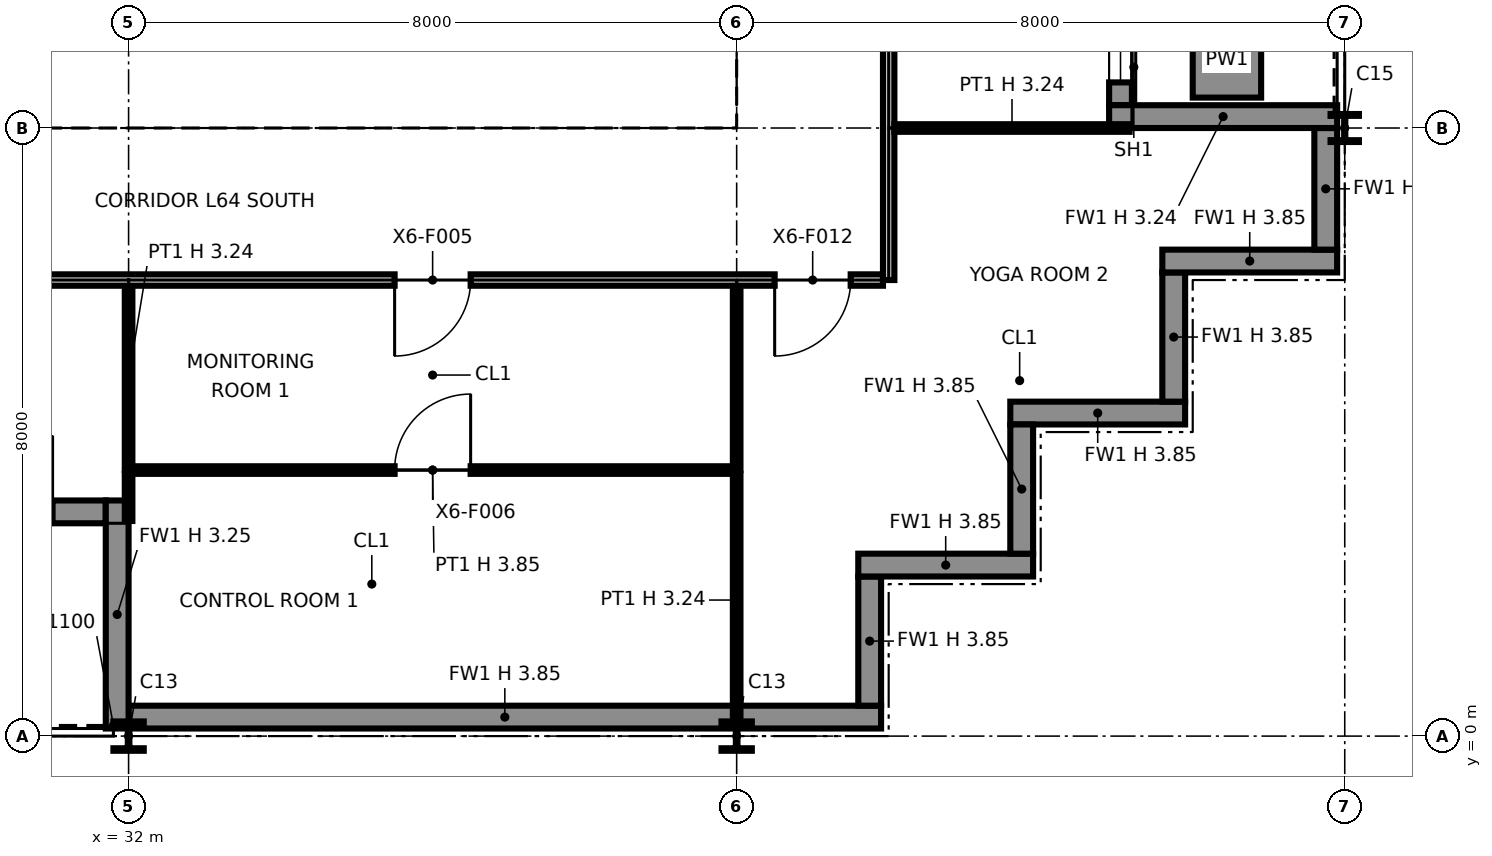
"""IFC4 building model, lengths in metres.
Left out: names, types, materials, properties, quantities, classifications, styles, units other than length and angle.
Written with IfcOpenShell. Run it as: python <this file> out.ifc"""

import sys

from ifc_helpers import new_model, si_unit, direction, frame, frame_2d, origin, origin_2d, place, context, subcontext, project, spatial, polyline, rectangle, i_section, outline, extrude, element, fill, save


model = new_model("IFC4")
c1 = context("Model", 3, precision=1e-05, world=origin(), true_north=direction((0.0, 1.0)))
c2 = subcontext(c1, "Body", "Model", "MODEL_VIEW")
j1 = project(units=[si_unit("LENGTHUNIT", "METRE"), si_unit("PLANEANGLEUNIT", "RADIAN")], contexts=[c1])
p1 = place(None, origin())
s1 = spatial("IfcSite", under=j1, at=p1, CompositionType="ELEMENT")
p2 = place(p1, origin())
s2 = spatial("IfcBuilding", under=s1, at=p2, CompositionType="ELEMENT")
p3 = place(p2, frame((0.0, 0.0, 291.0)))
s3 = spatial("IfcBuildingStorey", under=s2, at=p3, CompositionType="ELEMENT", Elevation=291.0)
p4 = place(p3, frame((32.0, 0.0, 0.0), z_axis=(0.0, 0.0, 1.0), x_axis=(1.0, 0.0, 0.0)))
e1 = element("IfcColumn", 1, at=p4, inside=s3, PredefinedType="COLUMN", context=c2, shape_type="SweptSolid", body=[
    extrude(i_section(OverallWidth=0.399, OverallDepth=0.386, WebThickness=0.021, FlangeThickness=0.033, at=origin_2d()), origin(), (0.0, 0.0, 1.0), 3.85),
])
p5 = place(p3, frame((32.0, 8.0, 0.0), z_axis=(0.0, 0.0, 1.0), x_axis=(1.0, 0.0, 0.0)))
e2 = element("IfcColumn", 2, at=p5, inside=s3, PredefinedType="COLUMN", context=c2, shape_type="SweptSolid", body=[
    extrude(i_section(OverallWidth=0.257, OverallDepth=0.363, WebThickness=0.013, FlangeThickness=0.022, at=origin_2d()), origin(), (0.0, 0.0, 1.0), 3.85),
])
p6 = place(p3, frame((40.0, 0.0, 0.0), z_axis=(0.0, 0.0, 1.0), x_axis=(1.0, 0.0, 0.0)))
e3 = element("IfcColumn", 3, at=p6, inside=s3, PredefinedType="COLUMN", context=c2, shape_type="SweptSolid", body=[
    extrude(i_section(OverallWidth=0.399, OverallDepth=0.386, WebThickness=0.021, FlangeThickness=0.033, at=origin_2d()), origin(), (0.0, 0.0, 1.0), 3.85),
])
p7 = place(p3, frame((40.0, 8.0, 0.0), z_axis=(0.0, 0.0, 1.0), x_axis=(1.0, 0.0, 0.0)))
e4 = element("IfcColumn", 4, at=p7, inside=s3, PredefinedType="COLUMN", context=c2, shape_type="SweptSolid", body=[
    extrude(i_section(OverallWidth=0.257, OverallDepth=0.363, WebThickness=0.013, FlangeThickness=0.022, at=origin_2d()), origin(), (0.0, 0.0, 1.0), 3.85),
])
p8 = place(p3, frame((48.0, 8.0, 0.0), z_axis=(0.0, 0.0, 1.0), x_axis=(1.0, 0.0, 0.0)))
e5 = element("IfcColumn", 5, at=p8, inside=s3, PredefinedType="COLUMN", context=c2, shape_type="SweptSolid", body=[
    extrude(i_section(OverallWidth=0.373, OverallDepth=0.368, WebThickness=0.015, FlangeThickness=0.024, at=origin_2d()), origin(), (0.0, 0.0, 1.0), 3.85),
])
p9 = place(p3, frame((24.3, 2.95, 0.0), z_axis=(0.0, 0.0, 1.0), x_axis=(1.0, 0.0, 0.0)))
e6 = element("IfcWall", 6, at=p9, inside=s3, PredefinedType="SOLIDWALL", context=c2, shape_type="SweptSolid", body=[
    extrude(rectangle(XDim=7.4, YDim=0.3, at=frame_2d((3.7, 0.0))), origin(), (0.0, 0.0, 1.0), 3.85),
])
p10 = place(p9, frame((0.3, 0.0, 0.9)))
e7 = element("IfcOpeningElement", 7, at=p10, cuts=e6, PredefinedType="OPENING", context=c2, shape_type="SweptSolid", body=[
    extrude(rectangle(XDim=2.8, YDim=2.2, at=frame_2d((1.4, 1.1))), frame((0.0, 0.16, 0.0), z_axis=(0.0, -1.0, 0.0), x_axis=(1.0, 0.0, 0.0)), (0.0, 0.0, 1.0), 0.32),
])
p11 = place(p9, frame((4.7, 0.0, 0.0)))
e8 = element("IfcOpeningElement", 8, at=p11, cuts=e6, PredefinedType="OPENING", context=c2, shape_type="SweptSolid", body=[
    extrude(rectangle(XDim=2.0, YDim=2.4, at=frame_2d((1.0, 1.2))), frame((0.0, 0.16, 0.0), z_axis=(0.0, -1.0, 0.0), x_axis=(1.0, 0.0, 0.0)), (0.0, 0.0, 1.0), 0.32),
])
p12 = place(p3, frame((31.85, 0.1, 0.0), z_axis=(0.0, 0.0, 1.0), x_axis=(0.0, 1.0, 0.0)))
e9 = element("IfcWall", 9, at=p12, inside=s3, PredefinedType="SOLIDWALL", context=c2, shape_type="SweptSolid", body=[
    extrude(rectangle(XDim=3.0, YDim=0.3, at=frame_2d((1.5, 0.0))), origin(), (0.0, 0.0, 1.0), 3.247),
])
p13 = place(p3, frame((32.0, 0.25, 0.0), z_axis=(0.0, 0.0, 1.0), x_axis=(1.0, 0.0, 0.0)))
e10 = element("IfcWall", 10, at=p13, inside=s3, PredefinedType="SOLIDWALL", context=c2, shape_type="SweptSolid", body=[
    extrude(rectangle(XDim=9.9, YDim=0.3, at=frame_2d((4.95, 0.0))), origin(), (0.0, 0.0, 1.0), 3.85),
])
p14 = place(p3, frame((41.75, 0.4, 0.0), z_axis=(0.0, 0.0, 1.0), x_axis=(0.0, 1.0, 0.0)))
e11 = element("IfcWall", 11, at=p14, inside=s3, PredefinedType="SOLIDWALL", context=c2, shape_type="SweptSolid", body=[
    extrude(rectangle(XDim=1.7, YDim=0.3, at=frame_2d((0.85, 0.0))), origin(), (0.0, 0.0, 1.0), 3.85),
])
p15 = place(p3, frame((41.6, 2.25, 0.0), z_axis=(0.0, 0.0, 1.0), x_axis=(1.0, 0.0, 0.0)))
e12 = element("IfcWall", 12, at=p15, inside=s3, PredefinedType="SOLIDWALL", context=c2, shape_type="SweptSolid", body=[
    extrude(rectangle(XDim=2.3, YDim=0.3, at=frame_2d((1.15, 0.0))), origin(), (0.0, 0.0, 1.0), 3.85),
])
p16 = place(p3, frame((43.75, 2.4, 0.0), z_axis=(0.0, 0.0, 1.0), x_axis=(0.0, 1.0, 0.0)))
e13 = element("IfcWall", 13, at=p16, inside=s3, PredefinedType="SOLIDWALL", context=c2, shape_type="SweptSolid", body=[
    extrude(rectangle(XDim=1.7, YDim=0.3, at=frame_2d((0.85, 0.0))), origin(), (0.0, 0.0, 1.0), 3.85),
])
p17 = place(p3, frame((43.6, 4.25, 0.0), z_axis=(0.0, 0.0, 1.0), x_axis=(1.0, 0.0, 0.0)))
e14 = element("IfcWall", 14, at=p17, inside=s3, PredefinedType="SOLIDWALL", context=c2, shape_type="SweptSolid", body=[
    extrude(rectangle(XDim=2.3, YDim=0.3, at=frame_2d((1.15, 0.0))), origin(), (0.0, 0.0, 1.0), 3.85),
])
p18 = place(p3, frame((45.75, 4.4, 0.0), z_axis=(0.0, 0.0, 1.0), x_axis=(0.0, 1.0, 0.0)))
e15 = element("IfcWall", 15, at=p18, inside=s3, PredefinedType="SOLIDWALL", context=c2, shape_type="SweptSolid", body=[
    extrude(rectangle(XDim=1.7, YDim=0.3, at=frame_2d((0.85, 0.0))), origin(), (0.0, 0.0, 1.0), 3.85),
])
p19 = place(p3, frame((45.6, 6.25, 0.0), z_axis=(0.0, 0.0, 1.0), x_axis=(1.0, 0.0, 0.0)))
e16 = element("IfcWall", 16, at=p19, inside=s3, PredefinedType="SOLIDWALL", context=c2, shape_type="SweptSolid", body=[
    extrude(rectangle(XDim=2.3, YDim=0.3, at=frame_2d((1.15, 0.0))), origin(), (0.0, 0.0, 1.0), 3.85),
])
p20 = place(p3, frame((47.75, 6.4, 0.0), z_axis=(0.0, 0.0, 1.0), x_axis=(0.0, 1.0, 0.0)))
e17 = element("IfcWall", 17, at=p20, inside=s3, PredefinedType="SOLIDWALL", context=c2, shape_type="SweptSolid", body=[
    extrude(rectangle(XDim=1.6, YDim=0.3, at=frame_2d((0.8, 0.0))), origin(), (0.0, 0.0, 1.0), 3.85),
])
p21 = place(p3, frame((45.05, 8.3, 0.0), z_axis=(0.0, 0.0, 1.0), x_axis=(0.0, 1.0, 0.0)))
e18 = element("IfcWall", 18, at=p21, inside=s3, PredefinedType="SOLIDWALL", context=c2, shape_type="SweptSolid", body=[
    extrude(rectangle(XDim=7.4, YDim=0.3, at=frame_2d((3.7, 0.0))), origin(), (0.0, 0.0, 1.0), 3.85),
])
p22 = place(p21, frame((0.3, 0.0, 0.9)))
e19 = element("IfcOpeningElement", 19, at=p22, cuts=e18, PredefinedType="OPENING", context=c2, shape_type="SweptSolid", body=[
    extrude(rectangle(XDim=2.8, YDim=2.2, at=frame_2d((1.4, 1.1))), frame((0.0, 0.16, 0.0), z_axis=(0.0, -1.0, 0.0), x_axis=(1.0, 0.0, 0.0)), (0.0, 0.0, 1.0), 0.32),
])
p23 = place(p21, frame((4.7, 0.0, 0.0)))
e20 = element("IfcOpeningElement", 20, at=p23, cuts=e18, PredefinedType="OPENING", context=c2, shape_type="SweptSolid", body=[
    extrude(rectangle(XDim=2.0, YDim=2.4, at=frame_2d((1.0, 1.2))), frame((0.0, 0.16, 0.0), z_axis=(0.0, -1.0, 0.0), x_axis=(1.0, 0.0, 0.0)), (0.0, 0.0, 1.0), 0.32),
])
p24 = place(p3, frame((47.9, 8.15, 0.0), z_axis=(0.0, 0.0, 1.0), x_axis=(-1.0, 0.0, 0.0)))
e21 = element("IfcWall", 21, at=p24, inside=s3, PredefinedType="SOLIDWALL", context=c2, shape_type="SweptSolid", body=[
    extrude(rectangle(XDim=3.0, YDim=0.3, at=frame_2d((1.5, 0.0))), origin(), (0.0, 0.0, 1.0), 3.237),
])
p25 = place(p3, frame((46.45, 8.4, 0.0), z_axis=(0.0, 0.0, 1.0), x_axis=(0.0, 1.0, 0.0)))
e22 = element("IfcWall", 22, at=p25, inside=s3, PredefinedType="SOLIDWALL", context=c2, shape_type="SweptSolid", body=[
    extrude(rectangle(XDim=3.2, YDim=0.9, at=frame_2d((1.6, 0.0))), origin(), (0.0, 0.0, 1.0), 0.6),
])
p26 = place(p3, frame((24.65, 8.75, 0.0), z_axis=(0.0, 0.0, 1.0), x_axis=(1.0, 0.0, 0.0)))
e23 = element("IfcWall", 23, at=p26, inside=s3, PredefinedType="PARTITIONING", context=c2, shape_type="SweptSolid", body=[
    extrude(outline(polyline([(0.0, 0.0), (14.7, 0.0), (14.7, 3.85), (7.438, 3.85), (7.437, 3.318), (7.263, 3.318), (7.262, 3.85), (0.0, 3.85), (0.0, 0.0)])), frame((0.0, 0.1, 0.0), z_axis=(0.0, -1.0, 0.0), x_axis=(1.0, 0.0, 0.0)), (0.0, 0.0, 1.0), 0.2),
])
p27 = place(p3, frame((32.0, 8.85, 0.0), z_axis=(0.0, 0.0, 1.0), x_axis=(0.0, 1.0, 0.0)))
e24 = element("IfcWall", 24, at=p27, inside=s3, PredefinedType="PARTITIONING", context=c2, shape_type="SweptSolid", body=[
    extrude(rectangle(XDim=2.55, YDim=0.6, at=frame_2d((1.275, 0.0))), origin(), (0.0, 0.0, 1.0), 3.318),
])
for number, where, z_axis, x_axis in (
    (25, (35.6, 8.85, 0.0), (0.0, 0.0, 1.0), (0.0, 1.0, 0.0)),
    (26, (39.25, 8.85, 0.0), (0.0, 0.0, 1.0), (0.0, 1.0, 0.0)),
):
    element("IfcWall", number, at=place(p3, frame(where, z_axis=z_axis, x_axis=x_axis)), inside=s3, PredefinedType="PARTITIONING", context=c2, shape_type="SweptSolid", body=[
        extrude(rectangle(XDim=6.3, YDim=0.2, at=frame_2d((3.15, 0.0))), origin(), (0.0, 0.0, 1.0), 3.85),
    ])
p28 = place(p3, frame((40.0, 0.13, 0.0), z_axis=(0.0, 0.0, 1.0), x_axis=(0.0, 1.0, 0.0)))
e27 = element("IfcWall", 27, at=p28, inside=s3, PredefinedType="PARTITIONING", context=c2, shape_type="SweptSolid", body=[
    extrude(rectangle(XDim=3.32, YDim=0.1, at=frame_2d((1.66, 0.0))), origin(), (0.0, 0.0, 1.0), 3.238),
])
p29 = place(p3, frame((32.0, 2.83, 0.0), z_axis=(0.0, 0.0, 1.0), x_axis=(0.0, 1.0, 0.0)))
e28 = element("IfcWall", 28, at=p29, inside=s3, PredefinedType="PARTITIONING", context=c2, shape_type="SweptSolid", body=[
    extrude(rectangle(XDim=0.62, YDim=0.1, at=frame_2d((0.31, 0.0))), origin(), (0.0, 0.0, 1.0), 3.238),
])
p30 = place(p3, frame((32.05, 3.5, 0.0), z_axis=(0.0, 0.0, 1.0), x_axis=(1.0, 0.0, 0.0)))
e29 = element("IfcWall", 29, at=p30, inside=s3, PredefinedType="PARTITIONING", context=c2, shape_type="SweptSolid", body=[
    extrude(rectangle(XDim=7.9, YDim=0.1, at=frame_2d((3.95, 0.0))), origin(), (0.0, 0.0, 1.0), 3.85),
])
p31 = place(p30, frame((3.45, 0.0, 0.0)))
e30 = element("IfcOpeningElement", 30, at=p31, cuts=e29, PredefinedType="OPENING", context=c2, shape_type="SweptSolid", body=[
    extrude(rectangle(XDim=1.0, YDim=2.1, at=frame_2d((0.5, 1.05))), frame((0.0, 0.06, 0.0), z_axis=(0.0, -1.0, 0.0), x_axis=(1.0, 0.0, 0.0)), (0.0, 0.0, 1.0), 0.12),
])
for number, where, z_axis, x_axis in (
    (31, (32.0, 3.5, 0.0), (0.0, 0.0, 1.0), (0.0, 1.0, 0.0)),
    (32, (40.0, 3.5, 0.0), (0.0, 0.0, 1.0), (0.0, 1.0, 0.0)),
):
    element("IfcWall", number, at=place(p3, frame(where, z_axis=z_axis, x_axis=x_axis)), inside=s3, PredefinedType="PARTITIONING", context=c2, shape_type="SweptSolid", body=[
        extrude(rectangle(XDim=2.425, YDim=0.1, at=frame_2d((1.212, 0.0))), origin(), (0.0, 0.0, 1.0), 3.238),
    ])
p32 = place(p3, frame((6.075, 6.0, 0.0), z_axis=(0.0, 0.0, 1.0), x_axis=(1.0, 0.0, 0.0)))
e33 = element("IfcWall", 33, at=p32, inside=s3, PredefinedType="PARTITIONING", context=c2, shape_type="SweptSolid", body=[
    extrude(rectangle(XDim=35.85, YDim=0.15, at=frame_2d((17.925, 0.0))), origin(), (0.0, 0.0, 1.0), 3.85),
])
p33 = place(p32, frame((12.425, 0.0, 0.0), z_axis=(0.0, 0.0, 1.0), x_axis=(-1.0, 0.0, 0.0)))
e34 = element("IfcOpeningElement", 34, at=p33, cuts=e33, PredefinedType="OPENING", context=c2, shape_type="SweptSolid", body=[
    extrude(rectangle(XDim=1.0, YDim=2.1, at=frame_2d((0.5, 1.05))), frame((0.0, 0.085, 0.0), z_axis=(0.0, -1.0, 0.0), x_axis=(1.0, 0.0, 0.0)), (0.0, 0.0, 1.0), 0.17),
])
p34 = place(p32, frame((16.425, 0.0, 0.0), z_axis=(0.0, 0.0, 1.0), x_axis=(-1.0, 0.0, 0.0)))
e35 = element("IfcOpeningElement", 35, at=p34, cuts=e33, PredefinedType="OPENING", context=c2, shape_type="SweptSolid", body=[
    extrude(rectangle(XDim=1.0, YDim=2.1, at=frame_2d((0.5, 1.05))), frame((0.0, 0.085, 0.0), z_axis=(0.0, -1.0, 0.0), x_axis=(1.0, 0.0, 0.0)), (0.0, 0.0, 1.0), 0.17),
])
p35 = place(p32, frame((30.425, 0.0, 0.0), z_axis=(0.0, 0.0, 1.0), x_axis=(-1.0, 0.0, 0.0)))
e36 = element("IfcOpeningElement", 36, at=p35, cuts=e33, PredefinedType="OPENING", context=c2, shape_type="SweptSolid", body=[
    extrude(rectangle(XDim=1.0, YDim=2.1, at=frame_2d((0.5, 1.05))), frame((0.0, 0.085, 0.0), z_axis=(0.0, -1.0, 0.0), x_axis=(1.0, 0.0, 0.0)), (0.0, 0.0, 1.0), 0.17),
])
p36 = place(p32, frame((4.425, 0.0, 0.0), z_axis=(0.0, 0.0, 1.0), x_axis=(-1.0, 0.0, 0.0)))
e37 = element("IfcOpeningElement", 37, at=p36, cuts=e33, PredefinedType="OPENING", context=c2, shape_type="SweptSolid", body=[
    extrude(rectangle(XDim=1.0, YDim=2.1, at=frame_2d((0.5, 1.05))), frame((0.0, 0.085, 0.0), z_axis=(0.0, -1.0, 0.0), x_axis=(1.0, 0.0, 0.0)), (0.0, 0.0, 1.0), 0.17),
])
p37 = place(p32, frame((8.425, 0.0, 0.0), z_axis=(0.0, 0.0, 1.0), x_axis=(-1.0, 0.0, 0.0)))
e38 = element("IfcOpeningElement", 38, at=p37, cuts=e33, PredefinedType="OPENING", context=c2, shape_type="SweptSolid", body=[
    extrude(rectangle(XDim=1.0, YDim=2.1, at=frame_2d((0.5, 1.05))), frame((0.0, 0.085, 0.0), z_axis=(0.0, -1.0, 0.0), x_axis=(1.0, 0.0, 0.0)), (0.0, 0.0, 1.0), 0.17),
])
p38 = place(p32, frame((19.425, 0.0, 0.0), z_axis=(0.0, 0.0, 1.0), x_axis=(-1.0, 0.0, 0.0)))
e39 = element("IfcOpeningElement", 39, at=p38, cuts=e33, PredefinedType="OPENING", context=c2, shape_type="SweptSolid", body=[
    extrude(rectangle(XDim=1.0, YDim=2.1, at=frame_2d((0.5, 1.05))), frame((0.0, 0.085, 0.0), z_axis=(0.0, -1.0, 0.0), x_axis=(1.0, 0.0, 0.0)), (0.0, 0.0, 1.0), 0.17),
])
p39 = place(p32, frame((24.425, 0.0, 0.0), z_axis=(0.0, 0.0, 1.0), x_axis=(-1.0, 0.0, 0.0)))
e40 = element("IfcOpeningElement", 40, at=p39, cuts=e33, PredefinedType="OPENING", context=c2, shape_type="SweptSolid", body=[
    extrude(rectangle(XDim=1.0, YDim=2.1, at=frame_2d((0.5, 1.05))), frame((0.0, 0.085, 0.0), z_axis=(0.0, -1.0, 0.0), x_axis=(1.0, 0.0, 0.0)), (0.0, 0.0, 1.0), 0.17),
])
p40 = place(p32, frame((35.425, 0.0, 0.0), z_axis=(0.0, 0.0, 1.0), x_axis=(-1.0, 0.0, 0.0)))
e41 = element("IfcOpeningElement", 41, at=p40, cuts=e33, PredefinedType="OPENING", context=c2, shape_type="SweptSolid", body=[
    extrude(rectangle(XDim=1.0, YDim=2.1, at=frame_2d((0.5, 1.05))), frame((0.0, 0.085, 0.0), z_axis=(0.0, -1.0, 0.0), x_axis=(1.0, 0.0, 0.0)), (0.0, 0.0, 1.0), 0.17),
])
p41 = place(p3, frame((42.0, 6.0, 0.0), z_axis=(0.0, 0.0, 1.0), x_axis=(0.0, 1.0, 0.0)))
e42 = element("IfcWall", 42, at=p41, inside=s3, PredefinedType="PARTITIONING", context=c2, shape_type="SweptSolid", body=[
    extrude(outline(polyline([(0.0, 0.0), (11.925, 0.0), (11.925, 3.85), (10.3, 3.85), (10.298, 3.238), (9.702, 3.238), (9.7, 3.85), (6.3, 3.85), (6.298, 3.238), (5.702, 3.238), (5.7, 3.85), (2.3, 3.85), (2.298, 3.238), (1.702, 3.238), (1.7, 3.85), (0.0, 3.85), (0.0, 0.0)])), frame((0.0, 0.075, 0.0), z_axis=(0.0, -1.0, 0.0), x_axis=(1.0, 0.0, 0.0)), (0.0, 0.0, 1.0), 0.15),
])
p42 = place(p41, frame((6.5, 0.0, 0.0), z_axis=(0.0, 0.0, 1.0), x_axis=(-1.0, 0.0, 0.0)))
e43 = element("IfcOpeningElement", 43, at=p42, cuts=e42, PredefinedType="OPENING", context=c2, shape_type="SweptSolid", body=[
    extrude(rectangle(XDim=1.0, YDim=2.1, at=frame_2d((0.5, 1.05))), frame((0.0, 0.085, 0.0), z_axis=(0.0, -1.0, 0.0), x_axis=(1.0, 0.0, 0.0)), (0.0, 0.0, 1.0), 0.17),
])
p43 = place(p41, frame((11.5, 0.0, 0.0), z_axis=(0.0, 0.0, 1.0), x_axis=(-1.0, 0.0, 0.0)))
e44 = element("IfcOpeningElement", 44, at=p43, cuts=e42, PredefinedType="OPENING", context=c2, shape_type="SweptSolid", body=[
    extrude(rectangle(XDim=1.0, YDim=2.1, at=frame_2d((0.5, 1.05))), frame((0.0, 0.085, 0.0), z_axis=(0.0, -1.0, 0.0), x_axis=(1.0, 0.0, 0.0)), (0.0, 0.0, 1.0), 0.17),
])
p44 = place(p3, frame((42.075, 8.0, 0.0), z_axis=(0.0, 0.0, 1.0), x_axis=(1.0, 0.0, 0.0)))
e45 = element("IfcWall", 45, at=p44, inside=s3, PredefinedType="PARTITIONING", context=c2, shape_type="SweptSolid", body=[
    extrude(rectangle(XDim=3.095, YDim=0.1, at=frame_2d((1.547, 0.0))), origin(), (0.0, 0.0, 1.0), 3.238),
])
p45 = place(p22, origin())
e46 = element("IfcWindow", 46, at=p45, inside=s3, PartitioningType="SINGLE_PANEL", PredefinedType="WINDOW", context=c2, shape_type="SweptSolid", body=[
    extrude(rectangle(XDim=2.8, YDim=2.2, at=frame_2d((1.4, 1.1))), frame((0.0, 0.03, 0.0), z_axis=(0.0, -1.0, 0.0), x_axis=(1.0, 0.0, 0.0)), (0.0, 0.0, 1.0), 0.06),
])
fill(e19, e46)
p46 = place(p35, origin())
e47 = element("IfcDoor", 47, at=p46, inside=s3, OperationType="SINGLE_SWING_RIGHT", PredefinedType="DOOR", context=c2, shape_type="SweptSolid", body=[
    extrude(rectangle(XDim=1.0, YDim=2.1, at=frame_2d((0.5, 1.05))), frame((0.0, 0.025, 0.0), z_axis=(0.0, -1.0, 0.0), x_axis=(1.0, 0.0, 0.0)), (0.0, 0.0, 1.0), 0.05),
])
fill(e36, e47)
p47 = place(p31, origin())
e48 = element("IfcDoor", 48, at=p47, inside=s3, OperationType="SINGLE_SWING_RIGHT", PredefinedType="DOOR", context=c2, shape_type="SweptSolid", body=[
    extrude(rectangle(XDim=1.0, YDim=2.1, at=frame_2d((0.5, 1.05))), frame((0.0, 0.025, 0.0), z_axis=(0.0, -1.0, 0.0), x_axis=(1.0, 0.0, 0.0)), (0.0, 0.0, 1.0), 0.05),
])
fill(e30, e48)
p48 = place(p40, origin())
e49 = element("IfcDoor", 49, at=p48, inside=s3, OperationType="SINGLE_SWING_RIGHT", PredefinedType="DOOR", context=c2, shape_type="SweptSolid", body=[
    extrude(rectangle(XDim=1.0, YDim=2.1, at=frame_2d((0.5, 1.05))), frame((0.0, 0.025, 0.0), z_axis=(0.0, -1.0, 0.0), x_axis=(1.0, 0.0, 0.0)), (0.0, 0.0, 1.0), 0.05),
])
fill(e41, e49)
save(model, sys.argv[1])
